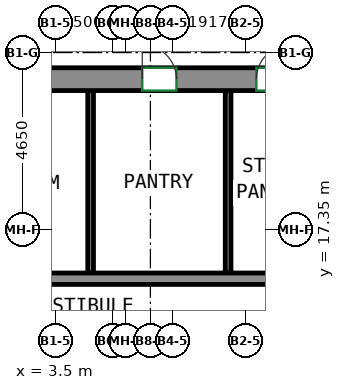
"""IFC4 building model, lengths in metres.
Left out: names, types, materials, properties, quantities, classifications, styles, units other than length and angle.
Written with IfcOpenShell. Run it as: python <this file> out.ifc"""

import sys

from ifc_helpers import new_model, si_unit, direction, frame, frame_2d, origin, place, context, subcontext, project, spatial, rectangle, extrude, source, transform, mapped, element, fill, save


model = new_model("IFC4")
c1 = context("Model", 3, precision=1e-05, world=origin(), true_north=direction((0.0, 1.0)))
c2 = subcontext(c1, "Body", "Model", "MODEL_VIEW")
j1 = project(units=[si_unit("LENGTHUNIT", "METRE"), si_unit("PLANEANGLEUNIT", "RADIAN")], contexts=[c1])
p1 = place(None, origin())
s1 = spatial("IfcSite", under=j1, at=p1, CompositionType="ELEMENT")
p2 = place(p1, origin())
s2 = spatial("IfcBuilding", under=s1, at=p2, CompositionType="ELEMENT")
p3 = place(p2, frame((0.0, 0.0, 295.0)))
s3 = spatial("IfcBuildingStorey", under=s2, at=p3, CompositionType="ELEMENT", Elevation=295.0)
m1 = source(origin(), c2, "Body", "SweptSolid", [
    extrude(rectangle(XDim=33.3, YDim=0.6, at=frame_2d((16.65, 0.0))), origin(), (0.0, 0.0, 1.0), 3.12),
])
p4 = place(p3, frame((-15.6, 21.3, 0.0), z_axis=(0.0, 0.0, 1.0), x_axis=(1.0, 0.0, 0.0)))
e1 = element("IfcWall", 1, at=p4, inside=s3, PredefinedType="SHEAR", context=c2, shape_type="MappedRepresentation", body=[
    mapped(m1, transform((0.0, 0.0, 0.0))),
])
p5 = place(p4, frame((6.431, 0.0, 0.0)))
e2 = element("IfcOpeningElement", 2, at=p5, cuts=e1, PredefinedType="OPENING", context=c2, shape_type="SweptSolid", body=[
    extrude(rectangle(XDim=0.9, YDim=2.1, at=frame_2d((0.45, 1.05))), frame((0.0, 0.31, 0.0), z_axis=(0.0, -1.0, 0.0), x_axis=(1.0, 0.0, 0.0)), (0.0, 0.0, 1.0), 0.62),
])
p6 = place(p4, frame((11.738, 0.0, 0.0)))
e3 = element("IfcOpeningElement", 3, at=p6, cuts=e1, PredefinedType="OPENING", context=c2, shape_type="SweptSolid", body=[
    extrude(rectangle(XDim=0.9, YDim=2.1, at=frame_2d((0.45, 1.05))), frame((0.0, 0.31, 0.0), z_axis=(0.0, -1.0, 0.0), x_axis=(1.0, 0.0, 0.0)), (0.0, 0.0, 1.0), 0.62),
])
p7 = place(p4, frame((17.165, 0.0, 0.0)))
e4 = element("IfcOpeningElement", 4, at=p7, cuts=e1, PredefinedType="OPENING", context=c2, shape_type="SweptSolid", body=[
    extrude(rectangle(XDim=0.9, YDim=2.1, at=frame_2d((0.45, 1.05))), frame((0.0, 0.31, 0.0), z_axis=(0.0, -1.0, 0.0), x_axis=(1.0, 0.0, 0.0)), (0.0, 0.0, 1.0), 0.62),
])
p8 = place(p4, frame((21.386, 0.0, 0.0)))
e5 = element("IfcOpeningElement", 5, at=p8, cuts=e1, PredefinedType="OPENING", context=c2, shape_type="SweptSolid", body=[
    extrude(rectangle(XDim=0.9, YDim=2.1, at=frame_2d((0.45, 1.05))), frame((0.0, 0.31, 0.0), z_axis=(0.0, -1.0, 0.0), x_axis=(1.0, 0.0, 0.0)), (0.0, 0.0, 1.0), 0.62),
])
p9 = place(p4, frame((24.387, 0.0, 0.0)))
e6 = element("IfcOpeningElement", 6, at=p9, cuts=e1, PredefinedType="OPENING", context=c2, shape_type="SweptSolid", body=[
    extrude(rectangle(XDim=0.9, YDim=2.1, at=frame_2d((0.45, 1.05))), frame((0.0, 0.31, 0.0), z_axis=(0.0, -1.0, 0.0), x_axis=(1.0, 0.0, 0.0)), (0.0, 0.0, 1.0), 0.62),
])
p10 = place(p4, frame((26.92, 0.0, 0.0)))
e7 = element("IfcOpeningElement", 7, at=p10, cuts=e1, PredefinedType="OPENING", context=c2, shape_type="SweptSolid", body=[
    extrude(rectangle(XDim=0.9, YDim=2.1, at=frame_2d((0.45, 1.05))), frame((0.0, 0.31, 0.0), z_axis=(0.0, -1.0, 0.0), x_axis=(1.0, 0.0, 0.0)), (0.0, 0.0, 1.0), 0.62),
])
p11 = place(p4, frame((2.125, 0.0, 0.0)))
e8 = element("IfcOpeningElement", 8, at=p11, cuts=e1, PredefinedType="OPENING", context=c2, shape_type="SweptSolid", body=[
    extrude(rectangle(XDim=0.9, YDim=2.1, at=frame_2d((0.45, 1.05))), frame((0.0, 0.31, 0.0), z_axis=(0.0, -1.0, 0.0), x_axis=(1.0, 0.0, 0.0)), (0.0, 0.0, 1.0), 0.62),
])
p12 = place(p4, frame((30.275, 0.0, 0.0)))
e9 = element("IfcOpeningElement", 9, at=p12, cuts=e1, PredefinedType="OPENING", context=c2, shape_type="SweptSolid", body=[
    extrude(rectangle(XDim=0.9, YDim=2.1, at=frame_2d((0.45, 1.05))), frame((0.0, 0.31, 0.0), z_axis=(0.0, -1.0, 0.0), x_axis=(1.0, 0.0, 0.0)), (0.0, 0.0, 1.0), 0.62),
])
m2 = source(origin(), c2, "Body", "SweptSolid", [
    extrude(rectangle(XDim=22.08, YDim=0.3, at=frame_2d((11.04, 0.0))), origin(), (0.0, 0.0, 1.0), 3.12),
])
p13 = place(p3, frame((-11.01, 16.05, 0.0), z_axis=(0.0, 0.0, 1.0), x_axis=(1.0, 0.0, 0.0)))
e10 = element("IfcWall", 10, at=p13, inside=s3, PredefinedType="SHEAR", context=c2, shape_type="MappedRepresentation", body=[
    mapped(m2, transform((0.0, 0.0, 0.0))),
])
m3 = source(origin(), c2, "Body", "SweptSolid", [
    extrude(rectangle(XDim=4.8, YDim=0.15, at=frame_2d((2.4, 0.0))), origin(), (0.0, 0.0, 1.0), 3.12),
])
for number, where, z_axis, x_axis in (
    (11, (4.427, 16.2, 0.0), (0.0, 0.0, 1.0), (0.0, 1.0, 0.0)),
    (12, (8.045, 16.2, 0.0), (0.0, 0.0, 1.0), (0.0, 1.0, 0.0)),
):
    element("IfcWall", number, at=place(p3, frame(where, z_axis=z_axis, x_axis=x_axis)), inside=s3, PredefinedType="PARTITIONING", context=c2, shape_type="MappedRepresentation", body=[
        mapped(m3, transform((0.0, 0.0, 0.0))),
    ])
p14 = place(p8, origin())
e13 = element("IfcDoor", 13, at=p14, inside=s3, OperationType="SINGLE_SWING_LEFT", PredefinedType="DOOR", context=c2, shape_type="SweptSolid", body=[
    extrude(rectangle(XDim=0.9, YDim=2.1, at=frame_2d((0.45, 1.05))), frame((0.0, -0.155, 0.0), z_axis=(0.0, -1.0, 0.0), x_axis=(1.0, 0.0, 0.0)), (0.0, 0.0, 1.0), 0.05),
])
fill(e5, e13)
p15 = place(p9, origin())
e14 = element("IfcDoor", 14, at=p15, inside=s3, OperationType="SINGLE_SWING_RIGHT", PredefinedType="DOOR", context=c2, shape_type="SweptSolid", body=[
    extrude(rectangle(XDim=0.9, YDim=2.1, at=frame_2d((0.45, 1.05))), frame((0.0, -0.155, 0.0), z_axis=(0.0, -1.0, 0.0), x_axis=(1.0, 0.0, 0.0)), (0.0, 0.0, 1.0), 0.05),
])
fill(e6, e14)
save(model, sys.argv[1])
